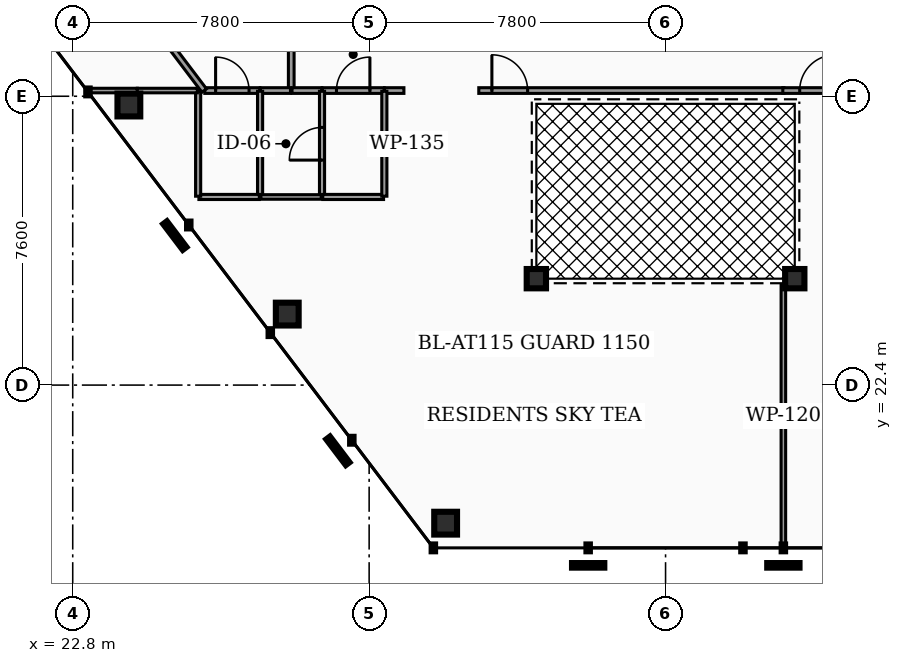
"""IFC4 building model, lengths in metres.
Left out: names, types, materials, properties, quantities, classifications, styles, units other than length and angle.
Written with IfcOpenShell. Run it as: python <this file> out.ifc"""

import sys

from ifc_helpers import new_model, si_unit, direction, frame, frame_2d, origin, origin_2d, place, context, subcontext, project, spatial, rectangle, hollow_rectangle, hollow_circle, extrude, element, fill, save


model = new_model("IFC4")
c1 = context("Model", 3, precision=1e-05, world=origin(), true_north=direction((0.0, 1.0)))
c2 = subcontext(c1, "Body", "Model", "MODEL_VIEW")
j1 = project(units=[si_unit("LENGTHUNIT", "METRE"), si_unit("PLANEANGLEUNIT", "RADIAN")], contexts=[c1])
p1 = place(None, origin())
s1 = spatial("IfcSite", under=j1, at=p1, CompositionType="ELEMENT")
p2 = place(p1, origin())
s2 = spatial("IfcBuilding", under=s1, at=p2, CompositionType="ELEMENT")
p3 = place(p2, frame((0.0, 0.0, 222.36)))
s3 = spatial("IfcBuildingStorey", under=s2, at=p3, CompositionType="ELEMENT", Elevation=222.36)
for number, where, z_axis, x_axis in (
    (1, (24.278, 29.769, 0.0), (0.0, 0.0, 1.0), (1.0, 0.0, 0.0)),
    (2, (28.445, 24.268, 0.0), (0.0, 0.0, 1.0), (1.0, 0.0, 0.0)),
    (3, (32.613, 18.767, 0.0), (0.0, 0.0, 1.0), (1.0, 0.0, 0.0)),
):
    element("IfcColumn", number, at=place(p3, frame(where, z_axis=z_axis, x_axis=x_axis)), inside=s3, PredefinedType="COLUMN", context=c2, shape_type="SweptSolid", body=[
        extrude(hollow_rectangle(XDim=0.6, YDim=0.6, WallThickness=0.03, at=origin_2d()), origin(), (0.0, 0.0, 1.0), 3.18),
    ])
for number, where, z_axis, x_axis in (
    (4, (35.0, 25.2, 0.0), (0.0, 0.0, 1.0), (1.0, 0.0, 0.0)),
    (5, (41.8, 25.2, 0.0), (0.0, 0.0, 1.0), (1.0, 0.0, 0.0)),
):
    element("IfcColumn", number, at=place(p3, frame(where, z_axis=z_axis, x_axis=x_axis)), inside=s3, PredefinedType="COLUMN", context=c2, shape_type="SweptSolid", body=[
        extrude(hollow_circle(Radius=0.254, WallThickness=0.02, at=origin_2d()), origin(), (0.0, 0.0, 1.0), 3.18),
    ])
p4 = place(p3, frame((28.55, 30.17, 0.0), z_axis=(0.0, 0.0, 1.0), x_axis=(0.0, 1.0, 0.0)))
e6 = element("IfcWall", 6, at=p4, inside=s3, PredefinedType="PARTITIONING", context=c2, shape_type="SweptSolid", body=[
    extrude(rectangle(XDim=3.06, YDim=0.15, at=frame_2d((1.53, 0.0))), origin(), (0.0, 0.0, 1.0), 2.235),
])
p5 = place(p4, frame((1.06, 0.0, 0.0)))
e7 = element("IfcOpeningElement", 7, at=p5, cuts=e6, PredefinedType="OPENING", context=c2, shape_type="SweptSolid", body=[
    extrude(rectangle(XDim=0.94, YDim=2.05, at=frame_2d((0.47, 1.025))), frame((0.0, 0.085, 0.0), z_axis=(0.0, -1.0, 0.0), x_axis=(1.0, 0.0, 0.0)), (0.0, 0.0, 1.0), 0.17),
])
p6 = place(p3, frame((29.365, 30.15, 0.0), z_axis=(0.0, 0.0, 1.0), x_axis=(1.0, 0.0, 0.0)))
e8 = element("IfcWall", 8, at=p6, inside=s3, PredefinedType="PARTITIONING", context=c2, shape_type="SweptSolid", body=[
    extrude(rectangle(XDim=1.63, YDim=0.15, at=frame_2d((0.815, 0.0))), origin(), (0.0, 0.0, 1.0), 2.235),
])
p7 = place(p6, frame((0.375, 0.0, 0.0)))
e9 = element("IfcOpeningElement", 9, at=p7, cuts=e8, PredefinedType="OPENING", context=c2, shape_type="SweptSolid", body=[
    extrude(rectangle(XDim=0.88, YDim=2.05, at=frame_2d((0.44, 1.025))), frame((0.0, 0.085, 0.0), z_axis=(0.0, -1.0, 0.0), x_axis=(1.0, 0.0, 0.0)), (0.0, 0.0, 1.0), 0.17),
])
p8 = place(p3, frame((28.57, 30.15, 0.0), z_axis=(0.0, 0.0, 1.0), x_axis=(1.0, 0.0, 0.0)))
e10 = element("IfcWall", 10, at=p8, inside=s3, PredefinedType="PARTITIONING", context=c2, shape_type="SweptSolid", body=[
    extrude(rectangle(XDim=0.785, YDim=0.15, at=frame_2d((0.393, 0.0))), origin(), (0.0, 0.0, 1.0), 2.235),
])
p9 = place(p3, frame((33.485, 30.15, 0.0), z_axis=(0.0, 0.0, 1.0), x_axis=(1.0, 0.0, 0.0)))
e11 = element("IfcWall", 11, at=p9, inside=s3, PredefinedType="PARTITIONING", context=c2, shape_type="SweptSolid", body=[
    extrude(rectangle(XDim=8.03, YDim=0.15, at=frame_2d((4.015, 0.0))), origin(), (0.0, 0.0, 1.0), 2.235),
])
p10 = place(p9, frame((0.345, 0.0, 0.0)))
e12 = element("IfcOpeningElement", 12, at=p10, cuts=e11, PredefinedType="OPENING", context=c2, shape_type="SweptSolid", body=[
    extrude(rectangle(XDim=0.94, YDim=2.05, at=frame_2d((0.47, 1.025))), frame((0.0, 0.085, 0.0), z_axis=(0.0, -1.0, 0.0), x_axis=(1.0, 0.0, 0.0)), (0.0, 0.0, 1.0), 0.17),
])
p11 = place(p3, frame((31.005, 30.15, 0.0), z_axis=(0.0, 0.0, 1.0), x_axis=(1.0, 0.0, 0.0)))
e13 = element("IfcWall", 13, at=p11, inside=s3, PredefinedType="PARTITIONING", context=c2, shape_type="SweptSolid", body=[
    extrude(rectangle(XDim=0.51, YDim=0.15, at=frame_2d((0.255, 0.0))), origin(), (0.0, 0.0, 1.0), 2.235),
])
p12 = place(p3, frame((41.485, 30.15, 0.0), z_axis=(0.0, 0.0, 1.0), x_axis=(1.0, 0.0, 0.0)))
e14 = element("IfcWall", 14, at=p12, inside=s3, PredefinedType="PARTITIONING", context=c2, shape_type="SweptSolid", body=[
    extrude(rectangle(XDim=1.83, YDim=0.15, at=frame_2d((0.915, 0.0))), origin(), (0.0, 0.0, 1.0), 2.235),
])
p13 = place(p12, frame((0.445, 0.0, 0.0)))
e15 = element("IfcOpeningElement", 15, at=p13, cuts=e14, PredefinedType="OPENING", context=c2, shape_type="SweptSolid", body=[
    extrude(rectangle(XDim=0.94, YDim=2.05, at=frame_2d((0.47, 1.025))), frame((0.0, 0.085, 0.0), z_axis=(0.0, -1.0, 0.0), x_axis=(1.0, 0.0, 0.0)), (0.0, 0.0, 1.0), 0.17),
])
p14 = place(p3, frame((26.275, 30.15, 0.0), z_axis=(0.0, 0.0, 1.0), x_axis=(1.0, 0.0, 0.0)))
e16 = element("IfcWall", 16, at=p14, inside=s3, PredefinedType="PARTITIONING", context=c2, shape_type="SweptSolid", body=[
    extrude(rectangle(XDim=1.45, YDim=0.15, at=frame_2d((0.725, 0.0))), origin(), (0.0, 0.0, 1.0), 2.235),
])
p15 = place(p14, frame((0.285, 0.0, 0.0)))
e17 = element("IfcOpeningElement", 17, at=p15, cuts=e16, PredefinedType="OPENING", context=c2, shape_type="SweptSolid", body=[
    extrude(rectangle(XDim=0.88, YDim=2.05, at=frame_2d((0.44, 1.025))), frame((0.0, 0.085, 0.0), z_axis=(0.0, -1.0, 0.0), x_axis=(1.0, 0.0, 0.0)), (0.0, 0.0, 1.0), 0.17),
])
p16 = place(p3, frame((27.735, 30.15, 0.0), z_axis=(0.0, 0.0, 1.0), x_axis=(1.0, 0.0, 0.0)))
e18 = element("IfcWall", 18, at=p16, inside=s3, PredefinedType="PARTITIONING", context=c2, shape_type="SweptSolid", body=[
    extrude(rectangle(XDim=0.795, YDim=0.15, at=frame_2d((0.397, 0.0))), origin(), (0.0, 0.0, 1.0), 2.235),
])
p17 = place(p3, frame((24.757, 32.134, 0.0), z_axis=(0.0, 0.0, 1.0), x_axis=(0.603806698968, -0.797130773638, 0.0)))
e19 = element("IfcWall", 19, at=p17, inside=s3, PredefinedType="PARTITIONING", context=c2, shape_type="SweptSolid", body=[
    extrude(rectangle(XDim=2.489, YDim=0.15, at=frame_2d((1.245, 0.0))), origin(), (0.0, 0.0, 1.0), 2.235),
])
p18 = place(p3, frame((29.36, 27.37, 0.0), z_axis=(0.0, 0.0, 1.0), x_axis=(0.0, 1.0, 0.0)))
e20 = element("IfcWall", 20, at=p18, inside=s3, PredefinedType="PARTITIONING", context=c2, shape_type="SweptSolid", body=[
    extrude(rectangle(XDim=2.76, YDim=0.135, at=frame_2d((1.38, 0.0))), origin(), (0.0, 0.0, 1.0), 2.235),
])
p19 = place(p18, frame((0.95, 0.0, 0.0)))
e21 = element("IfcOpeningElement", 21, at=p19, cuts=e20, PredefinedType="OPENING", context=c2, shape_type="SweptSolid", body=[
    extrude(rectangle(XDim=0.86, YDim=2.05, at=frame_2d((0.43, 1.025))), frame((0.0, 0.077, 0.0), z_axis=(0.0, -1.0, 0.0), x_axis=(1.0, 0.0, 0.0)), (0.0, 0.0, 1.0), 0.155),
])
p20 = place(p3, frame((29.38, 27.35, 0.0), z_axis=(0.0, 0.0, 1.0), x_axis=(1.0, 0.0, 0.0)))
e22 = element("IfcWall", 22, at=p20, inside=s3, PredefinedType="PARTITIONING", context=c2, shape_type="SweptSolid", body=[
    extrude(rectangle(XDim=1.6, YDim=0.135, at=frame_2d((0.8, 0.0))), origin(), (0.0, 0.0, 1.0), 2.235),
])
for number, where, z_axis, x_axis in (
    (23, (31.0, 27.37, 0.0), (0.0, 0.0, 1.0), (0.0, 1.0, 0.0)),
    (24, (27.73, 27.37, 0.0), (0.0, 0.0, 1.0), (0.0, 1.0, 0.0)),
):
    element("IfcWall", number, at=place(p3, frame(where, z_axis=z_axis, x_axis=x_axis)), inside=s3, PredefinedType="PARTITIONING", context=c2, shape_type="SweptSolid", body=[
        extrude(rectangle(XDim=2.76, YDim=0.135, at=frame_2d((1.38, 0.0))), origin(), (0.0, 0.0, 1.0), 2.235),
    ])
p21 = place(p3, frame((26.12, 27.35, 0.0), z_axis=(0.0, 0.0, 1.0), x_axis=(1.0, 0.0, 0.0)))
e25 = element("IfcWall", 25, at=p21, inside=s3, PredefinedType="PARTITIONING", context=c2, shape_type="SweptSolid", body=[
    extrude(rectangle(XDim=1.59, YDim=0.135, at=frame_2d((0.795, 0.0))), origin(), (0.0, 0.0, 1.0), 2.235),
])
p22 = place(p3, frame((26.1, 27.37, 0.0), z_axis=(0.0, 0.0, 1.0), x_axis=(0.0, 1.0, 0.0)))
e26 = element("IfcWall", 26, at=p22, inside=s3, PredefinedType="PARTITIONING", context=c2, shape_type="SweptSolid", body=[
    extrude(rectangle(XDim=2.76, YDim=0.135, at=frame_2d((1.38, 0.0))), origin(), (0.0, 0.0, 1.0), 2.235),
])
p23 = place(p3, frame((27.75, 27.35, 0.0), z_axis=(0.0, 0.0, 1.0), x_axis=(1.0, 0.0, 0.0)))
e27 = element("IfcWall", 27, at=p23, inside=s3, PredefinedType="PARTITIONING", context=c2, shape_type="SweptSolid", body=[
    extrude(rectangle(XDim=1.59, YDim=0.12, at=frame_2d((0.795, 0.0))), origin(), (0.0, 0.0, 1.0), 2.235),
])
p24 = place(p3, frame((41.5, 18.132, 0.0), z_axis=(0.0, 0.0, 1.0), x_axis=(0.0, 1.0, 0.0)))
e28 = element("IfcWall", 28, at=p24, inside=s3, PredefinedType="PARTITIONING", context=c2, shape_type="SweptSolid", body=[
    extrude(rectangle(XDim=6.888, YDim=0.12, at=frame_2d((3.444, 0.0))), origin(), (0.0, 0.0, 1.0), 2.235),
])
p25 = place(p3, frame((23.189, 30.15, 0.0), z_axis=(0.0, 0.0, 1.0), x_axis=(1.0, 0.0, 0.0)))
e29 = element("IfcWall", 29, at=p25, inside=s3, PredefinedType="PARTITIONING", context=c2, shape_type="SweptSolid", body=[
    extrude(rectangle(XDim=1.311, YDim=0.12, at=frame_2d((0.656, 0.0))), origin(), (0.0, 0.0, 1.0), 2.235),
])
p26 = place(p3, frame((24.5, 30.15, 0.0), z_axis=(0.0, 0.0, 1.0), x_axis=(1.0, 0.0, 0.0)))
e30 = element("IfcWall", 30, at=p26, inside=s3, PredefinedType="PARTITIONING", context=c2, shape_type="SweptSolid", body=[
    extrude(rectangle(XDim=1.58, YDim=0.12, at=frame_2d((0.79, 0.0))), origin(), (0.0, 0.0, 1.0), 2.235),
])
p27 = place(p7, origin())
e31 = element("IfcDoor", 31, at=p27, inside=s3, OperationType="SINGLE_SWING_RIGHT", PredefinedType="DOOR", context=c2, shape_type="SweptSolid", body=[
    extrude(rectangle(XDim=0.88, YDim=2.05, at=frame_2d((0.44, 1.025))), frame((0.0, 0.025, 0.0), z_axis=(0.0, -1.0, 0.0), x_axis=(1.0, 0.0, 0.0)), (0.0, 0.0, 1.0), 0.05),
])
fill(e9, e31)
p28 = place(p10, origin())
e32 = element("IfcDoor", 32, at=p28, inside=s3, OperationType="SINGLE_SWING_LEFT", PredefinedType="DOOR", context=c2, shape_type="SweptSolid", body=[
    extrude(rectangle(XDim=0.94, YDim=2.05, at=frame_2d((0.47, 1.025))), frame((0.0, 0.025, 0.0), z_axis=(0.0, -1.0, 0.0), x_axis=(1.0, 0.0, 0.0)), (0.0, 0.0, 1.0), 0.05),
])
fill(e12, e32)
p29 = place(p13, origin())
e33 = element("IfcDoor", 33, at=p29, inside=s3, OperationType="SINGLE_SWING_RIGHT", PredefinedType="DOOR", context=c2, shape_type="SweptSolid", body=[
    extrude(rectangle(XDim=0.94, YDim=2.05, at=frame_2d((0.47, 1.025))), frame((0.0, 0.025, 0.0), z_axis=(0.0, -1.0, 0.0), x_axis=(1.0, 0.0, 0.0)), (0.0, 0.0, 1.0), 0.05),
])
fill(e15, e33)
p30 = place(p15, origin())
e34 = element("IfcDoor", 34, at=p30, inside=s3, OperationType="SINGLE_SWING_LEFT", PredefinedType="DOOR", context=c2, shape_type="SweptSolid", body=[
    extrude(rectangle(XDim=0.88, YDim=2.05, at=frame_2d((0.44, 1.025))), frame((0.0, 0.025, 0.0), z_axis=(0.0, -1.0, 0.0), x_axis=(1.0, 0.0, 0.0)), (0.0, 0.0, 1.0), 0.05),
])
fill(e17, e34)
p31 = place(p19, origin())
e35 = element("IfcDoor", 35, at=p31, inside=s3, OperationType="SINGLE_SWING_LEFT", PredefinedType="DOOR", context=c2, shape_type="SweptSolid", body=[
    extrude(rectangle(XDim=0.86, YDim=2.05, at=frame_2d((0.43, 1.025))), frame((0.0, 0.025, 0.0), z_axis=(0.0, -1.0, 0.0), x_axis=(1.0, 0.0, 0.0)), (0.0, 0.0, 1.0), 0.05),
])
fill(e21, e35)
save(model, sys.argv[1])
